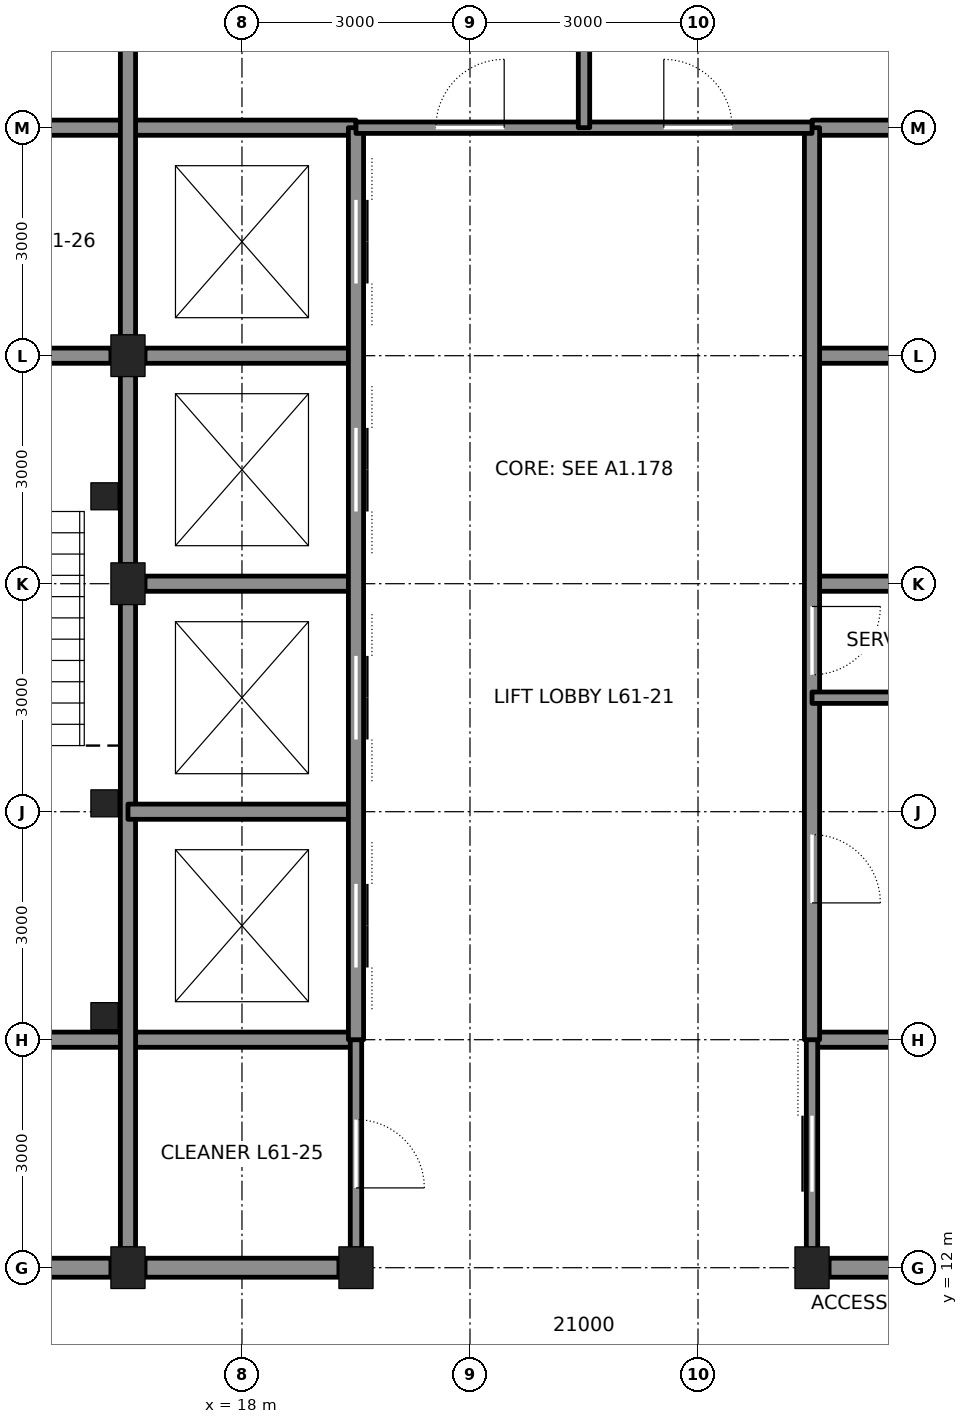
"""IFC4 building model, lengths in metres.
Left out: names, types, materials, properties, quantities, classifications, styles, units other than length and angle.
Written with IfcOpenShell. Run it as: python <this file> out.ifc"""

import sys

from ifc_helpers import new_model, si_unit, direction, frame, frame_2d, origin, origin_2d, place, context, subcontext, project, spatial, rectangle, hollow_rectangle, i_section, extrude, element, fill, save


model = new_model("IFC4")
c1 = context("Model", 3, precision=1e-05, world=origin(), true_north=direction((0.0, 1.0)))
c2 = subcontext(c1, "Body", "Model", "MODEL_VIEW")
j1 = project(units=[si_unit("LENGTHUNIT", "METRE"), si_unit("PLANEANGLEUNIT", "RADIAN")], contexts=[c1])
p1 = place(None, origin())
s1 = spatial("IfcSite", under=j1, at=p1, CompositionType="ELEMENT")
p2 = place(p1, origin())
s2 = spatial("IfcBuilding", under=s1, at=p2, CompositionType="ELEMENT")
p3 = place(p2, frame((0.0, 0.0, 274.8)))
s3 = spatial("IfcBuildingStorey", under=s2, at=p3, CompositionType="ELEMENT", Elevation=274.8)
for number, where, z_axis, x_axis in (
    (1, (16.5, 12.0, 0.0), (0.0, 0.0, 1.0), (1.0, 0.0, 0.0)),
    (2, (19.5, 12.0, 0.0), (0.0, 0.0, 1.0), (1.0, 0.0, 0.0)),
    (3, (25.5, 12.0, 0.0), (0.0, 0.0, 1.0), (1.0, 0.0, 0.0)),
    (4, (16.5, 21.0, 0.0), (0.0, 0.0, 1.0), (1.0, 0.0, 0.0)),
    (5, (16.5, 24.0, 0.0), (0.0, 0.0, 1.0), (1.0, 0.0, 0.0)),
):
    element("IfcColumn", number, at=place(p3, frame(where, z_axis=z_axis, x_axis=x_axis)), inside=s3, PredefinedType="COLUMN", context=c2, shape_type="SweptSolid", body=[
        extrude(i_section(OverallWidth=0.449, OverallDepth=0.549, WebThickness=0.072, FlangeThickness=0.115, at=origin_2d()), origin(), (0.0, 0.0, 1.0), 4.2),
    ])
p4 = place(p3, frame((12.25, 12.0, 0.0), z_axis=(0.0, 0.0, 1.0), x_axis=(1.0, 0.0, 0.0)))
e6 = element("IfcWall", 6, at=p4, inside=s3, PredefinedType="SOLIDWALL", context=c2, shape_type="SweptSolid", body=[
    extrude(rectangle(XDim=4.025, YDim=0.25, at=frame_2d((2.013, 0.0))), origin(), (0.0, 0.0, 1.0), 3.181),
])
for number, where, z_axis, x_axis in (
    (7, (16.725, 12.0, 0.0), (0.0, 0.0, 1.0), (1.0, 0.0, 0.0)),
    (8, (25.725, 12.0, 0.0), (0.0, 0.0, 1.0), (1.0, 0.0, 0.0)),
):
    element("IfcWall", number, at=place(p3, frame(where, z_axis=z_axis, x_axis=x_axis)), inside=s3, PredefinedType="SOLIDWALL", context=c2, shape_type="SweptSolid", body=[
        extrude(rectangle(XDim=2.55, YDim=0.25, at=frame_2d((1.275, 0.0))), origin(), (0.0, 0.0, 1.0), 3.181),
    ])
for number, where, z_axis, x_axis in (
    (9, (12.0, 15.0, 0.0), (0.0, 0.0, 1.0), (1.0, 0.0, 0.0)),
    (10, (25.5, 15.0, 0.0), (0.0, 0.0, 1.0), (1.0, 0.0, 0.0)),
):
    element("IfcWall", number, at=place(p3, frame(where, z_axis=z_axis, x_axis=x_axis)), inside=s3, PredefinedType="SOLIDWALL", context=c2, shape_type="SweptSolid", body=[
        extrude(rectangle(XDim=7.5, YDim=0.2, at=frame_2d((3.75, 0.0))), origin(), (0.0, 0.0, 1.0), 4.04),
    ])
p5 = place(p3, frame((12.225, 24.0, 0.0), z_axis=(0.0, 0.0, 1.0), x_axis=(1.0, 0.0, 0.0)))
e11 = element("IfcWall", 11, at=p5, inside=s3, PredefinedType="SOLIDWALL", context=c2, shape_type="SweptSolid", body=[
    extrude(rectangle(XDim=4.05, YDim=0.2, at=frame_2d((2.025, 0.0))), origin(), (0.0, 0.0, 1.0), 3.09),
])
p6 = place(p5, frame((1.425, 0.0, 0.0)))
e12 = element("IfcOpeningElement", 12, at=p6, cuts=e11, PredefinedType="OPENING", context=c2, shape_type="SweptSolid", body=[
    extrude(rectangle(XDim=1.2, YDim=2.1, at=frame_2d((0.6, 1.05))), frame((0.0, 0.11, 0.0), z_axis=(0.0, -1.0, 0.0), x_axis=(1.0, 0.0, 0.0)), (0.0, 0.0, 1.0), 0.22),
])
for number, where, z_axis, x_axis in (
    (13, (16.725, 24.0, 0.0), (0.0, 0.0, 1.0), (1.0, 0.0, 0.0)),
    (14, (25.5, 24.0, 0.0), (0.0, 0.0, 1.0), (1.0, 0.0, 0.0)),
):
    element("IfcWall", number, at=place(p3, frame(where, z_axis=z_axis, x_axis=x_axis)), inside=s3, PredefinedType="SOLIDWALL", context=c2, shape_type="SweptSolid", body=[
        extrude(rectangle(XDim=2.775, YDim=0.2, at=frame_2d((1.388, 0.0))), origin(), (0.0, 0.0, 1.0), 3.09),
    ])
p7 = place(p3, frame((12.0, 27.0, 0.0), z_axis=(0.0, 0.0, 1.0), x_axis=(1.0, 0.0, 0.0)))
e15 = element("IfcWall", 15, at=p7, inside=s3, PredefinedType="SOLIDWALL", context=c2, shape_type="SweptSolid", body=[
    extrude(rectangle(XDim=7.5, YDim=0.2, at=frame_2d((3.75, 0.0))), origin(), (0.0, 0.0, 1.0), 4.04),
])
p8 = place(p7, frame((1.65, 0.0, 0.0)))
e16 = element("IfcOpeningElement", 16, at=p8, cuts=e15, PredefinedType="OPENING", context=c2, shape_type="SweptSolid", body=[
    extrude(rectangle(XDim=1.2, YDim=2.1, at=frame_2d((0.6, 1.05))), frame((0.0, 0.11, 0.0), z_axis=(0.0, -1.0, 0.0), x_axis=(1.0, 0.0, 0.0)), (0.0, 0.0, 1.0), 0.22),
])
p9 = place(p3, frame((25.5, 27.0, 0.0), z_axis=(0.0, 0.0, 1.0), x_axis=(1.0, 0.0, 0.0)))
e17 = element("IfcWall", 17, at=p9, inside=s3, PredefinedType="SOLIDWALL", context=c2, shape_type="SweptSolid", body=[
    extrude(rectangle(XDim=3.0, YDim=0.2, at=frame_2d((1.5, 0.0))), origin(), (0.0, 0.0, 1.0), 4.04),
])
p10 = place(p3, frame((16.5, 12.25, 0.0), z_axis=(0.0, 0.0, 1.0), x_axis=(0.0, 1.0, 0.0)))
e18 = element("IfcWall", 18, at=p10, inside=s3, PredefinedType="SOLIDWALL", context=c2, shape_type="SweptSolid", body=[
    extrude(rectangle(XDim=8.5, YDim=0.2, at=frame_2d((4.25, 0.0))), origin(), (0.0, 0.0, 1.0), 3.113),
])
p11 = place(p3, frame((16.5, 21.25, 0.0), z_axis=(0.0, 0.0, 1.0), x_axis=(0.0, 1.0, 0.0)))
e19 = element("IfcWall", 19, at=p11, inside=s3, PredefinedType="SOLIDWALL", context=c2, shape_type="SweptSolid", body=[
    extrude(rectangle(XDim=2.5, YDim=0.2, at=frame_2d((1.25, 0.0))), origin(), (0.0, 0.0, 1.0), 3.113),
])
p12 = place(p3, frame((16.5, 24.25, 0.0), z_axis=(0.0, 0.0, 1.0), x_axis=(0.0, 1.0, 0.0)))
e20 = element("IfcWall", 20, at=p12, inside=s3, PredefinedType="SOLIDWALL", context=c2, shape_type="SweptSolid", body=[
    extrude(rectangle(XDim=8.5, YDim=0.2, at=frame_2d((4.25, 0.0))), origin(), (0.0, 0.0, 1.0), 3.113),
])
p13 = place(p3, frame((16.5, 18.0, 0.0), z_axis=(0.0, 0.0, 1.0), x_axis=(1.0, 0.0, 0.0)))
e21 = element("IfcWall", 21, at=p13, inside=s3, PredefinedType="SOLIDWALL", context=c2, shape_type="SweptSolid", body=[
    extrude(rectangle(XDim=3.0, YDim=0.2, at=frame_2d((1.5, 0.0))), origin(), (0.0, 0.0, 1.0), 4.04),
])
for number, where, z_axis, x_axis in (
    (22, (16.725, 21.0, 0.0), (0.0, 0.0, 1.0), (1.0, 0.0, 0.0)),
    (23, (25.5, 21.0, 0.0), (0.0, 0.0, 1.0), (1.0, 0.0, 0.0)),
):
    element("IfcWall", number, at=place(p3, frame(where, z_axis=z_axis, x_axis=x_axis)), inside=s3, PredefinedType="SOLIDWALL", context=c2, shape_type="SweptSolid", body=[
        extrude(rectangle(XDim=2.775, YDim=0.2, at=frame_2d((1.388, 0.0))), origin(), (0.0, 0.0, 1.0), 3.09),
    ])
p14 = place(p3, frame((19.5, 12.25, 0.0), z_axis=(0.0, 0.0, 1.0), x_axis=(0.0, 1.0, 0.0)))
e24 = element("IfcWall", 24, at=p14, inside=s3, PredefinedType="PARTITIONING", context=c2, shape_type="SweptSolid", body=[
    extrude(rectangle(XDim=2.75, YDim=0.15, at=frame_2d((1.375, 0.0))), origin(), (0.0, 0.0, 1.0), 3.064),
])
p15 = place(p14, frame((0.8, 0.0, 0.0)))
e25 = element("IfcOpeningElement", 25, at=p15, cuts=e24, PredefinedType="OPENING", context=c2, shape_type="SweptSolid", body=[
    extrude(rectangle(XDim=0.9, YDim=2.1, at=frame_2d((0.45, 1.05))), frame((0.0, 0.085, 0.0), z_axis=(0.0, -1.0, 0.0), x_axis=(1.0, 0.0, 0.0)), (0.0, 0.0, 1.0), 0.17),
])
p16 = place(p3, frame((19.5, 15.0, 0.0), z_axis=(0.0, 0.0, 1.0), x_axis=(0.0, 1.0, 0.0)))
e26 = element("IfcWall", 26, at=p16, inside=s3, PredefinedType="SOLIDWALL", context=c2, shape_type="SweptSolid", body=[
    extrude(rectangle(XDim=12.0, YDim=0.2, at=frame_2d((6.0, 0.0))), origin(), (0.0, 0.0, 1.0), 3.064),
])
p17 = place(p16, frame((0.95, 0.0, 0.0)))
e27 = element("IfcOpeningElement", 27, at=p17, cuts=e26, PredefinedType="OPENING", context=c2, shape_type="SweptSolid", body=[
    extrude(rectangle(XDim=1.1, YDim=2.1, at=frame_2d((0.55, 1.05))), frame((0.0, 0.11, 0.0), z_axis=(0.0, -1.0, 0.0), x_axis=(1.0, 0.0, 0.0)), (0.0, 0.0, 1.0), 0.22),
])
p18 = place(p16, frame((3.95, 0.0, 0.0)))
e28 = element("IfcOpeningElement", 28, at=p18, cuts=e26, PredefinedType="OPENING", context=c2, shape_type="SweptSolid", body=[
    extrude(rectangle(XDim=1.1, YDim=2.1, at=frame_2d((0.55, 1.05))), frame((0.0, 0.11, 0.0), z_axis=(0.0, -1.0, 0.0), x_axis=(1.0, 0.0, 0.0)), (0.0, 0.0, 1.0), 0.22),
])
p19 = place(p16, frame((6.95, 0.0, 0.0)))
e29 = element("IfcOpeningElement", 29, at=p19, cuts=e26, PredefinedType="OPENING", context=c2, shape_type="SweptSolid", body=[
    extrude(rectangle(XDim=1.1, YDim=2.1, at=frame_2d((0.55, 1.05))), frame((0.0, 0.11, 0.0), z_axis=(0.0, -1.0, 0.0), x_axis=(1.0, 0.0, 0.0)), (0.0, 0.0, 1.0), 0.22),
])
p20 = place(p16, frame((9.95, 0.0, 0.0)))
e30 = element("IfcOpeningElement", 30, at=p20, cuts=e26, PredefinedType="OPENING", context=c2, shape_type="SweptSolid", body=[
    extrude(rectangle(XDim=1.1, YDim=2.1, at=frame_2d((0.55, 1.05))), frame((0.0, 0.11, 0.0), z_axis=(0.0, -1.0, 0.0), x_axis=(1.0, 0.0, 0.0)), (0.0, 0.0, 1.0), 0.22),
])
p21 = place(p3, frame((25.5, 12.25, 0.0), z_axis=(0.0, 0.0, 1.0), x_axis=(0.0, 1.0, 0.0)))
e31 = element("IfcWall", 31, at=p21, inside=s3, PredefinedType="PARTITIONING", context=c2, shape_type="SweptSolid", body=[
    extrude(rectangle(XDim=2.75, YDim=0.15, at=frame_2d((1.375, 0.0))), origin(), (0.0, 0.0, 1.0), 3.064),
])
p22 = place(p21, frame((0.75, 0.0, 0.0)))
e32 = element("IfcOpeningElement", 32, at=p22, cuts=e31, PredefinedType="OPENING", context=c2, shape_type="SweptSolid", body=[
    extrude(rectangle(XDim=1.0, YDim=2.1, at=frame_2d((0.5, 1.05))), frame((0.0, 0.085, 0.0), z_axis=(0.0, -1.0, 0.0), x_axis=(1.0, 0.0, 0.0)), (0.0, 0.0, 1.0), 0.17),
])
p23 = place(p3, frame((25.5, 15.0, 0.0), z_axis=(0.0, 0.0, 1.0), x_axis=(0.0, 1.0, 0.0)))
e33 = element("IfcWall", 33, at=p23, inside=s3, PredefinedType="SOLIDWALL", context=c2, shape_type="SweptSolid", body=[
    extrude(rectangle(XDim=12.0, YDim=0.2, at=frame_2d((6.0, 0.0))), origin(), (0.0, 0.0, 1.0), 3.064),
])
p24 = place(p23, frame((1.8, 0.0, 0.0)))
e34 = element("IfcOpeningElement", 34, at=p24, cuts=e33, PredefinedType="OPENING", context=c2, shape_type="SweptSolid", body=[
    extrude(rectangle(XDim=0.9, YDim=2.1, at=frame_2d((0.45, 1.05))), frame((0.0, 0.11, 0.0), z_axis=(0.0, -1.0, 0.0), x_axis=(1.0, 0.0, 0.0)), (0.0, 0.0, 1.0), 0.22),
])
p25 = place(p23, frame((4.8, 0.0, 0.0)))
e35 = element("IfcOpeningElement", 35, at=p25, cuts=e33, PredefinedType="OPENING", context=c2, shape_type="SweptSolid", body=[
    extrude(rectangle(XDim=0.9, YDim=2.1, at=frame_2d((0.45, 1.05))), frame((0.0, 0.11, 0.0), z_axis=(0.0, -1.0, 0.0), x_axis=(1.0, 0.0, 0.0)), (0.0, 0.0, 1.0), 0.22),
])
p26 = place(p3, frame((19.5, 27.0, 0.0), z_axis=(0.0, 0.0, 1.0), x_axis=(1.0, 0.0, 0.0)))
e36 = element("IfcWall", 36, at=p26, inside=s3, PredefinedType="PARTITIONING", context=c2, shape_type="SweptSolid", body=[
    extrude(rectangle(XDim=6.0, YDim=0.15, at=frame_2d((3.0, 0.0))), origin(), (0.0, 0.0, 1.0), 4.04),
])
p27 = place(p26, frame((1.05, 0.0, 0.0)))
e37 = element("IfcOpeningElement", 37, at=p27, cuts=e36, PredefinedType="OPENING", context=c2, shape_type="SweptSolid", body=[
    extrude(rectangle(XDim=0.9, YDim=2.1, at=frame_2d((0.45, 1.05))), frame((0.0, 0.085, 0.0), z_axis=(0.0, -1.0, 0.0), x_axis=(1.0, 0.0, 0.0)), (0.0, 0.0, 1.0), 0.17),
])
p28 = place(p26, frame((4.05, 0.0, 0.0)))
e38 = element("IfcOpeningElement", 38, at=p28, cuts=e36, PredefinedType="OPENING", context=c2, shape_type="SweptSolid", body=[
    extrude(rectangle(XDim=0.9, YDim=2.1, at=frame_2d((0.45, 1.05))), frame((0.0, 0.085, 0.0), z_axis=(0.0, -1.0, 0.0), x_axis=(1.0, 0.0, 0.0)), (0.0, 0.0, 1.0), 0.17),
])
p29 = place(p3, frame((22.5, 27.0, 0.0), z_axis=(0.0, 0.0, 1.0), x_axis=(0.0, 1.0, 0.0)))
e39 = element("IfcWall", 39, at=p29, inside=s3, PredefinedType="PARTITIONING", context=c2, shape_type="SweptSolid", body=[
    extrude(rectangle(XDim=6.0, YDim=0.15, at=frame_2d((3.0, 0.0))), origin(), (0.0, 0.0, 1.0), 4.04),
])
p30 = place(p3, frame((25.5, 19.5, 0.0), z_axis=(0.0, 0.0, 1.0), x_axis=(1.0, 0.0, 0.0)))
e40 = element("IfcWall", 40, at=p30, inside=s3, PredefinedType="PARTITIONING", context=c2, shape_type="SweptSolid", body=[
    extrude(rectangle(XDim=3.0, YDim=0.15, at=frame_2d((1.5, 0.0))), origin(), (0.0, 0.0, 1.0), 4.04),
])
for number, where, z_axis, x_axis in (
    (41, (16.19, 15.31, 0.0), (0.0, 0.0, 1.0), (1.0, 0.0, 0.0)),
    (42, (16.19, 18.11, 0.0), (0.0, 0.0, 1.0), (1.0, 0.0, 0.0)),
    (43, (16.19, 22.15, 0.0), (0.0, 0.0, 1.0), (1.0, 0.0, 0.0)),
):
    element("IfcColumn", number, at=place(p3, frame(where, z_axis=z_axis, x_axis=x_axis)), inside=s3, PredefinedType="COLUMN", context=c2, shape_type="SweptSolid", body=[
        extrude(hollow_rectangle(XDim=0.356, YDim=0.356, WallThickness=0.009, at=origin_2d()), origin(), (0.0, 0.0, 1.0), 4.2),
    ])
p31 = place(p27, origin())
e44 = element("IfcDoor", 44, at=p31, inside=s3, OperationType="SINGLE_SWING_RIGHT", PredefinedType="DOOR", context=c2, shape_type="SweptSolid", body=[
    extrude(rectangle(XDim=0.9, YDim=2.1, at=frame_2d((0.45, 1.05))), frame((0.0, 0.025, 0.0), z_axis=(0.0, -1.0, 0.0), x_axis=(1.0, 0.0, 0.0)), (0.0, 0.0, 1.0), 0.05),
])
fill(e37, e44)
p32 = place(p28, origin())
e45 = element("IfcDoor", 45, at=p32, inside=s3, OperationType="SINGLE_SWING_LEFT", PredefinedType="DOOR", context=c2, shape_type="SweptSolid", body=[
    extrude(rectangle(XDim=0.9, YDim=2.1, at=frame_2d((0.45, 1.05))), frame((0.0, 0.025, 0.0), z_axis=(0.0, -1.0, 0.0), x_axis=(1.0, 0.0, 0.0)), (0.0, 0.0, 1.0), 0.05),
])
fill(e38, e45)
p33 = place(p22, origin())
e46 = element("IfcDoor", 46, at=p33, inside=s3, OperationType="SLIDING_TO_LEFT", PredefinedType="DOOR", context=c2, shape_type="SweptSolid", body=[
    extrude(rectangle(XDim=1.0, YDim=2.1, at=frame_2d((0.5, 1.05))), frame((0.0, 0.025, 0.0), z_axis=(0.0, -1.0, 0.0), x_axis=(1.0, 0.0, 0.0)), (0.0, 0.0, 1.0), 0.05),
])
fill(e32, e46)
p34 = place(p24, frame((0.9, 0.0, 0.0), z_axis=(0.0, 0.0, 1.0), x_axis=(-1.0, 0.0, 0.0)))
e47 = element("IfcDoor", 47, at=p34, inside=s3, OperationType="SINGLE_SWING_RIGHT", PredefinedType="DOOR", context=c2, shape_type="SweptSolid", body=[
    extrude(rectangle(XDim=0.9, YDim=2.1, at=frame_2d((0.45, 1.05))), frame((0.0, 0.025, 0.0), z_axis=(0.0, -1.0, 0.0), x_axis=(1.0, 0.0, 0.0)), (0.0, 0.0, 1.0), 0.05),
])
fill(e34, e47)
p35 = place(p25, frame((0.9, 0.0, 0.0), z_axis=(0.0, 0.0, 1.0), x_axis=(-1.0, 0.0, 0.0)))
e48 = element("IfcDoor", 48, at=p35, inside=s3, OperationType="SINGLE_SWING_LEFT", PredefinedType="DOOR", context=c2, shape_type="SweptSolid", body=[
    extrude(rectangle(XDim=0.9, YDim=2.1, at=frame_2d((0.45, 1.05))), frame((0.0, 0.025, 0.0), z_axis=(0.0, -1.0, 0.0), x_axis=(1.0, 0.0, 0.0)), (0.0, 0.0, 1.0), 0.05),
])
fill(e35, e48)
p36 = place(p15, frame((0.9, 0.0, 0.0), z_axis=(0.0, 0.0, 1.0), x_axis=(-1.0, 0.0, 0.0)))
e49 = element("IfcDoor", 49, at=p36, inside=s3, OperationType="SINGLE_SWING_RIGHT", PredefinedType="DOOR", context=c2, shape_type="SweptSolid", body=[
    extrude(rectangle(XDim=0.9, YDim=2.1, at=frame_2d((0.45, 1.05))), frame((0.0, 0.025, 0.0), z_axis=(0.0, -1.0, 0.0), x_axis=(1.0, 0.0, 0.0)), (0.0, 0.0, 1.0), 0.05),
])
fill(e25, e49)
p37 = place(p17, origin())
e50 = element("IfcDoor", 50, at=p37, inside=s3, OperationType="DOUBLE_DOOR_SLIDING", PredefinedType="DOOR", context=c2, shape_type="SweptSolid", body=[
    extrude(rectangle(XDim=1.1, YDim=2.1, at=frame_2d((0.55, 1.05))), frame((0.0, 0.025, 0.0), z_axis=(0.0, -1.0, 0.0), x_axis=(1.0, 0.0, 0.0)), (0.0, 0.0, 1.0), 0.05),
])
fill(e27, e50)
p38 = place(p18, origin())
e51 = element("IfcDoor", 51, at=p38, inside=s3, OperationType="DOUBLE_DOOR_SLIDING", PredefinedType="DOOR", context=c2, shape_type="SweptSolid", body=[
    extrude(rectangle(XDim=1.1, YDim=2.1, at=frame_2d((0.55, 1.05))), frame((0.0, 0.025, 0.0), z_axis=(0.0, -1.0, 0.0), x_axis=(1.0, 0.0, 0.0)), (0.0, 0.0, 1.0), 0.05),
])
fill(e28, e51)
p39 = place(p19, origin())
e52 = element("IfcDoor", 52, at=p39, inside=s3, OperationType="DOUBLE_DOOR_SLIDING", PredefinedType="DOOR", context=c2, shape_type="SweptSolid", body=[
    extrude(rectangle(XDim=1.1, YDim=2.1, at=frame_2d((0.55, 1.05))), frame((0.0, 0.025, 0.0), z_axis=(0.0, -1.0, 0.0), x_axis=(1.0, 0.0, 0.0)), (0.0, 0.0, 1.0), 0.05),
])
fill(e29, e52)
p40 = place(p20, origin())
e53 = element("IfcDoor", 53, at=p40, inside=s3, OperationType="DOUBLE_DOOR_SLIDING", PredefinedType="DOOR", context=c2, shape_type="SweptSolid", body=[
    extrude(rectangle(XDim=1.1, YDim=2.1, at=frame_2d((0.55, 1.05))), frame((0.0, 0.025, 0.0), z_axis=(0.0, -1.0, 0.0), x_axis=(1.0, 0.0, 0.0)), (0.0, 0.0, 1.0), 0.05),
])
fill(e30, e53)
save(model, sys.argv[1])
